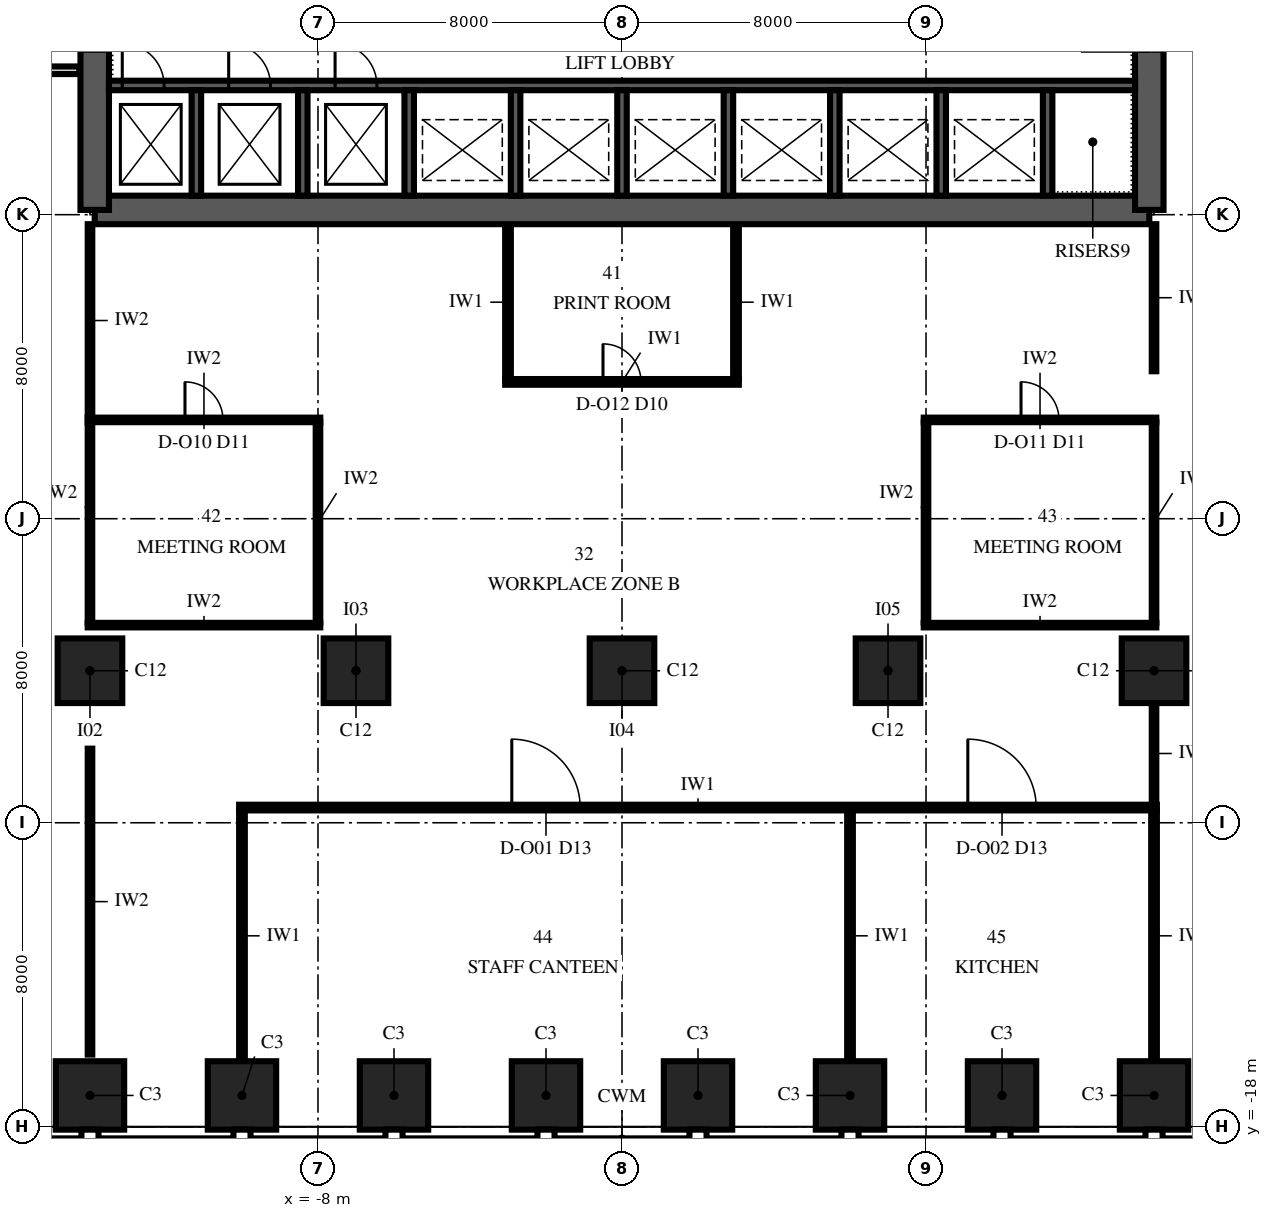
"""IFC4 building model, lengths in metres.
Left out: names, types, materials, properties, quantities, classifications, styles, units other than length and angle.
Written with IfcOpenShell. Run it as: python <this file> out.ifc"""

import sys

from ifc_helpers import new_model, si_unit, direction, frame, frame_2d, origin, origin_2d, place, context, subcontext, project, spatial, polyline, rectangle, outline, extrude, element, fill, save


model = new_model("IFC4")
c1 = context("Model", 3, precision=1e-05, world=origin(), true_north=direction((0.0, 1.0)))
c2 = subcontext(c1, "Body", "Model", "MODEL_VIEW")
j1 = project(units=[si_unit("LENGTHUNIT", "METRE"), si_unit("PLANEANGLEUNIT", "RADIAN")], contexts=[c1])
p1 = place(None, origin())
s1 = spatial("IfcSite", under=j1, at=p1, CompositionType="ELEMENT")
p2 = place(p1, origin())
s2 = spatial("IfcBuilding", under=s1, at=p2, CompositionType="ELEMENT")
p3 = place(p2, frame((0.0, 0.0, 127.0)))
s3 = spatial("IfcBuildingStorey", under=s2, at=p3, CompositionType="ELEMENT", Elevation=127.0)
for number, where, z_axis, x_axis in (
    (1, (-14.0, -17.175, 0.0), (0.0, 0.0, 1.0), (1.0, 0.0, 0.0)),
    (2, (-10.0, -17.175, 0.0), (0.0, 0.0, 1.0), (1.0, 0.0, 0.0)),
    (3, (-6.0, -17.175, 0.0), (0.0, 0.0, 1.0), (1.0, 0.0, 0.0)),
    (4, (-2.0, -17.175, 0.0), (0.0, 0.0, 1.0), (1.0, 0.0, 0.0)),
    (5, (2.0, -17.175, 0.0), (0.0, 0.0, 1.0), (1.0, 0.0, 0.0)),
    (6, (6.0, -17.175, 0.0), (0.0, 0.0, 1.0), (1.0, 0.0, 0.0)),
    (7, (10.0, -17.175, 0.0), (0.0, 0.0, 1.0), (1.0, 0.0, 0.0)),
    (8, (14.0, -17.175, 0.0), (0.0, 0.0, 1.0), (1.0, 0.0, 0.0)),
):
    element("IfcColumn", number, at=place(p3, frame(where, z_axis=z_axis, x_axis=x_axis)), inside=s3, PredefinedType="COLUMN", context=c2, shape_type="SweptSolid", body=[
        extrude(rectangle(XDim=1.8, YDim=1.8, at=origin_2d()), origin(), (0.0, 0.0, 1.0), 4.0),
    ])
for number, where, z_axis, x_axis in (
    (9, (-14.0, -6.0, 0.0), (0.0, 0.0, 1.0), (1.0, 0.0, 0.0)),
    (10, (-7.0, -6.0, 0.0), (0.0, 0.0, 1.0), (1.0, 0.0, 0.0)),
    (11, (0.0, -6.0, 0.0), (0.0, 0.0, 1.0), (1.0, 0.0, 0.0)),
    (12, (7.0, -6.0, 0.0), (0.0, 0.0, 1.0), (1.0, 0.0, 0.0)),
    (13, (14.0, -6.0, 0.0), (0.0, 0.0, 1.0), (1.0, 0.0, 0.0)),
):
    element("IfcColumn", number, at=place(p3, frame(where, z_axis=z_axis, x_axis=x_axis)), inside=s3, PredefinedType="COLUMN", context=c2, shape_type="SweptSolid", body=[
        extrude(rectangle(XDim=1.7, YDim=1.7, at=origin_2d()), origin(), (0.0, 0.0, 1.0), 4.0),
    ])
p4 = place(p3, frame((-13.875, 6.125, 0.0), z_axis=(0.0, 0.0, 1.0), x_axis=(1.0, 0.0, 0.0)))
e14 = element("IfcWall", 14, at=p4, inside=s3, PredefinedType="SHEAR", context=c2, shape_type="SweptSolid", body=[
    extrude(rectangle(XDim=27.75, YDim=0.75, at=frame_2d((13.875, 0.0))), origin(), (0.0, 0.0, 1.0), 4.0),
])
p5 = place(p3, frame((13.875, 6.125, 0.0), z_axis=(0.0, 0.0, 1.0), x_axis=(0.0, 1.0, 0.0)))
e15 = element("IfcWall", 15, at=p5, inside=s3, PredefinedType="SHEAR", context=c2, shape_type="SweptSolid", body=[
    extrude(outline(polyline([(0.0, -0.375), (17.75, -0.375), (17.75, 0.0), (17.375, 0.0), (17.375, 0.375), (0.375, 0.375), (0.375, 0.0), (0.0, 0.0), (0.0, -0.375)])), origin(), (0.0, 0.0, 1.0), 4.0),
])
p6 = place(p5, frame((4.175, 0.0, 0.0)))
e16 = element("IfcOpeningElement", 16, at=p6, cuts=e15, PredefinedType="OPENING", context=c2, shape_type="SweptSolid", body=[
    extrude(rectangle(XDim=1.8, YDim=2.4, at=frame_2d((0.9, 1.2))), frame((0.0, 0.39, 0.0), z_axis=(0.0, -1.0, 0.0), x_axis=(1.0, 0.0, 0.0)), (0.0, 0.0, 1.0), 0.78),
])
p7 = place(p3, frame((-13.875, 23.875, 0.0), z_axis=(0.0, 0.0, 1.0), x_axis=(0.0, -1.0, 0.0)))
e17 = element("IfcWall", 17, at=p7, inside=s3, PredefinedType="SHEAR", context=c2, shape_type="SweptSolid", body=[
    extrude(outline(polyline([(0.0, -0.375), (17.75, -0.375), (17.75, 0.0), (17.375, 0.0), (17.375, 0.375), (0.375, 0.375), (0.375, 0.0), (0.0, 0.0), (0.0, -0.375)])), origin(), (0.0, 0.0, 1.0), 4.0),
])
p8 = place(p7, frame((11.775, 0.0, 0.0)))
e18 = element("IfcOpeningElement", 18, at=p8, cuts=e17, PredefinedType="OPENING", context=c2, shape_type="SweptSolid", body=[
    extrude(rectangle(XDim=1.8, YDim=2.4, at=frame_2d((0.9, 1.2))), frame((0.0, 0.39, 0.0), z_axis=(0.0, -1.0, 0.0), x_axis=(1.0, 0.0, 0.0)), (0.0, 0.0, 1.0), 0.78),
])
p9 = place(p3, frame((-13.5, 9.4, 0.0), z_axis=(0.0, 0.0, 1.0), x_axis=(1.0, 0.0, 0.0)))
e19 = element("IfcWall", 19, at=p9, inside=s3, PredefinedType="SHEAR", context=c2, shape_type="SweptSolid", body=[
    extrude(rectangle(XDim=27.0, YDim=0.25, at=frame_2d((13.5, 0.0))), origin(), (0.0, 0.0, 1.0), 4.0),
])
p10 = place(p9, frame((0.35, 0.0, 0.0)))
e20 = element("IfcOpeningElement", 20, at=p10, cuts=e19, PredefinedType="OPENING", context=c2, shape_type="SweptSolid", body=[
    extrude(rectangle(XDim=1.1, YDim=2.1, at=frame_2d((0.55, 1.05))), frame((0.0, 0.14, 0.0), z_axis=(0.0, -1.0, 0.0), x_axis=(1.0, 0.0, 0.0)), (0.0, 0.0, 1.0), 0.28),
])
p11 = place(p9, frame((3.15, 0.0, 0.0)))
e21 = element("IfcOpeningElement", 21, at=p11, cuts=e19, PredefinedType="OPENING", context=c2, shape_type="SweptSolid", body=[
    extrude(rectangle(XDim=1.1, YDim=2.1, at=frame_2d((0.55, 1.05))), frame((0.0, 0.14, 0.0), z_axis=(0.0, -1.0, 0.0), x_axis=(1.0, 0.0, 0.0)), (0.0, 0.0, 1.0), 0.28),
])
p12 = place(p9, frame((5.95, 0.0, 0.0)))
e22 = element("IfcOpeningElement", 22, at=p12, cuts=e19, PredefinedType="OPENING", context=c2, shape_type="SweptSolid", body=[
    extrude(rectangle(XDim=1.1, YDim=2.1, at=frame_2d((0.55, 1.05))), frame((0.0, 0.14, 0.0), z_axis=(0.0, -1.0, 0.0), x_axis=(1.0, 0.0, 0.0)), (0.0, 0.0, 1.0), 0.28),
])
for number, where, z_axis, x_axis in (
    (23, (-11.2, 6.5, 0.0), (0.0, 0.0, 1.0), (0.0, 1.0, 0.0)),
    (24, (-8.4, 6.5, 0.0), (0.0, 0.0, 1.0), (0.0, 1.0, 0.0)),
    (25, (-5.6, 6.5, 0.0), (0.0, 0.0, 1.0), (0.0, 1.0, 0.0)),
    (26, (-2.8, 6.5, 0.0), (0.0, 0.0, 1.0), (0.0, 1.0, 0.0)),
    (27, (0.0, 6.5, 0.0), (0.0, 0.0, 1.0), (0.0, 1.0, 0.0)),
    (28, (2.8, 6.5, 0.0), (0.0, 0.0, 1.0), (0.0, 1.0, 0.0)),
    (29, (5.6, 6.5, 0.0), (0.0, 0.0, 1.0), (0.0, 1.0, 0.0)),
    (30, (8.4, 6.5, 0.0), (0.0, 0.0, 1.0), (0.0, 1.0, 0.0)),
    (31, (11.2, 6.5, 0.0), (0.0, 0.0, 1.0), (0.0, 1.0, 0.0)),
):
    element("IfcWall", number, at=place(p3, frame(where, z_axis=z_axis, x_axis=x_axis)), inside=s3, PredefinedType="SHEAR", context=c2, shape_type="SweptSolid", body=[
        extrude(rectangle(XDim=2.775, YDim=0.25, at=frame_2d((1.387, 0.0))), origin(), (0.0, 0.0, 1.0), 4.0),
    ])
p13 = place(p3, frame((-10.075, -9.6, 0.0), z_axis=(0.0, 0.0, 1.0), x_axis=(1.0, 0.0, 0.0)))
e32 = element("IfcWall", 32, at=p13, inside=s3, PredefinedType="PARTITIONING", context=c2, shape_type="SweptSolid", body=[
    extrude(rectangle(XDim=24.15, YDim=0.15, at=frame_2d((12.075, 0.0))), origin(), (0.0, 0.0, 1.0), 3.25),
])
p14 = place(p13, frame((7.175, 0.0, 0.0)))
e33 = element("IfcOpeningElement", 33, at=p14, cuts=e32, PredefinedType="OPENING", context=c2, shape_type="SweptSolid", body=[
    extrude(rectangle(XDim=1.8, YDim=2.4, at=frame_2d((0.9, 1.2))), frame((0.0, 0.09, 0.0), z_axis=(0.0, -1.0, 0.0), x_axis=(1.0, 0.0, 0.0)), (0.0, 0.0, 1.0), 0.18),
])
p15 = place(p13, frame((19.175, 0.0, 0.0)))
e34 = element("IfcOpeningElement", 34, at=p15, cuts=e32, PredefinedType="OPENING", context=c2, shape_type="SweptSolid", body=[
    extrude(rectangle(XDim=1.8, YDim=2.4, at=frame_2d((0.9, 1.2))), frame((0.0, 0.09, 0.0), z_axis=(0.0, -1.0, 0.0), x_axis=(1.0, 0.0, 0.0)), (0.0, 0.0, 1.0), 0.18),
])
for number, where, z_axis, x_axis in (
    (35, (-14.06, -4.8, 0.0), (0.0, 0.0, 1.0), (1.0, 0.0, 0.0)),
    (36, (7.94, -4.8, 0.0), (0.0, 0.0, 1.0), (1.0, 0.0, 0.0)),
):
    element("IfcWall", number, at=place(p3, frame(where, z_axis=z_axis, x_axis=x_axis)), inside=s3, PredefinedType="PARTITIONING", context=c2, shape_type="SweptSolid", body=[
        extrude(rectangle(XDim=6.12, YDim=0.12, at=frame_2d((3.06, 0.0))), origin(), (0.0, 0.0, 1.0), 3.25),
    ])
p16 = place(p3, frame((-14.06, 0.6, 0.0), z_axis=(0.0, 0.0, 1.0), x_axis=(1.0, 0.0, 0.0)))
e37 = element("IfcWall", 37, at=p16, inside=s3, PredefinedType="PARTITIONING", context=c2, shape_type="SweptSolid", body=[
    extrude(rectangle(XDim=6.12, YDim=0.12, at=frame_2d((3.06, 0.0))), origin(), (0.0, 0.0, 1.0), 3.25),
])
p17 = place(p16, frame((2.56, 0.0, 0.0)))
e38 = element("IfcOpeningElement", 38, at=p17, cuts=e37, PredefinedType="OPENING", context=c2, shape_type="SweptSolid", body=[
    extrude(rectangle(XDim=1.0, YDim=2.4, at=frame_2d((0.5, 1.2))), frame((0.0, 0.075, 0.0), z_axis=(0.0, -1.0, 0.0), x_axis=(1.0, 0.0, 0.0)), (0.0, 0.0, 1.0), 0.15),
])
p18 = place(p3, frame((7.94, 0.6, 0.0), z_axis=(0.0, 0.0, 1.0), x_axis=(1.0, 0.0, 0.0)))
e39 = element("IfcWall", 39, at=p18, inside=s3, PredefinedType="PARTITIONING", context=c2, shape_type="SweptSolid", body=[
    extrude(rectangle(XDim=6.12, YDim=0.12, at=frame_2d((3.06, 0.0))), origin(), (0.0, 0.0, 1.0), 3.25),
])
p19 = place(p18, frame((2.56, 0.0, 0.0)))
e40 = element("IfcOpeningElement", 40, at=p19, cuts=e39, PredefinedType="OPENING", context=c2, shape_type="SweptSolid", body=[
    extrude(rectangle(XDim=1.0, YDim=2.4, at=frame_2d((0.5, 1.2))), frame((0.0, 0.075, 0.0), z_axis=(0.0, -1.0, 0.0), x_axis=(1.0, 0.0, 0.0)), (0.0, 0.0, 1.0), 0.15),
])
p20 = place(p3, frame((-3.075, 1.6, 0.0), z_axis=(0.0, 0.0, 1.0), x_axis=(1.0, 0.0, 0.0)))
e41 = element("IfcWall", 41, at=p20, inside=s3, PredefinedType="PARTITIONING", context=c2, shape_type="SweptSolid", body=[
    extrude(rectangle(XDim=6.15, YDim=0.15, at=frame_2d((3.075, 0.0))), origin(), (0.0, 0.0, 1.0), 3.25),
])
p21 = place(p20, frame((2.575, 0.0, 0.0)))
e42 = element("IfcOpeningElement", 42, at=p21, cuts=e41, PredefinedType="OPENING", context=c2, shape_type="SweptSolid", body=[
    extrude(rectangle(XDim=1.0, YDim=2.3, at=frame_2d((0.5, 1.15))), frame((0.0, 0.09, 0.0), z_axis=(0.0, -1.0, 0.0), x_axis=(1.0, 0.0, 0.0)), (0.0, 0.0, 1.0), 0.18),
])
p22 = place(p3, frame((-16.3, 9.8, 0.0), z_axis=(0.0, 0.0, 1.0), x_axis=(1.0, 0.0, 0.0)))
e43 = element("IfcWall", 43, at=p22, inside=s3, PredefinedType="PARTITIONING", context=c2, shape_type="SweptSolid", body=[
    extrude(rectangle(XDim=2.02, YDim=0.2, at=frame_2d((1.01, 0.0))), origin(), (0.0, 0.0, 1.0), 3.85),
])
p23 = place(p3, frame((-14.0, -4.74, 0.0), z_axis=(0.0, 0.0, 1.0), x_axis=(0.0, 1.0, 0.0)))
e44 = element("IfcWall", 44, at=p23, inside=s3, PredefinedType="PARTITIONING", context=c2, shape_type="SweptSolid", body=[
    extrude(rectangle(XDim=5.28, YDim=0.12, at=frame_2d((2.64, 0.0))), origin(), (0.0, 0.0, 1.0), 3.25),
])
p24 = place(p3, frame((-10.0, -16.275, 0.0), z_axis=(0.0, 0.0, 1.0), x_axis=(0.0, 1.0, 0.0)))
e45 = element("IfcWall", 45, at=p24, inside=s3, PredefinedType="PARTITIONING", context=c2, shape_type="SweptSolid", body=[
    extrude(rectangle(XDim=6.6, YDim=0.15, at=frame_2d((3.3, 0.0))), origin(), (0.0, 0.0, 1.0), 3.25),
])
p25 = place(p3, frame((-8.0, -4.74, 0.0), z_axis=(0.0, 0.0, 1.0), x_axis=(0.0, 1.0, 0.0)))
e46 = element("IfcWall", 46, at=p25, inside=s3, PredefinedType="PARTITIONING", context=c2, shape_type="SweptSolid", body=[
    extrude(rectangle(XDim=5.28, YDim=0.12, at=frame_2d((2.64, 0.0))), origin(), (0.0, 0.0, 1.0), 3.85),
])
for number, where, z_axis, x_axis in (
    (47, (-3.0, 1.675, 0.0), (0.0, 0.0, 1.0), (0.0, 1.0, 0.0)),
    (48, (3.0, 1.675, 0.0), (0.0, 0.0, 1.0), (0.0, 1.0, 0.0)),
):
    element("IfcWall", number, at=place(p3, frame(where, z_axis=z_axis, x_axis=x_axis)), inside=s3, PredefinedType="PARTITIONING", context=c2, shape_type="SweptSolid", body=[
        extrude(rectangle(XDim=4.045, YDim=0.15, at=frame_2d((2.022, 0.0))), origin(), (0.0, 0.0, 1.0), 3.85),
    ])
p26 = place(p3, frame((6.0, -16.275, 0.0), z_axis=(0.0, 0.0, 1.0), x_axis=(0.0, 1.0, 0.0)))
e49 = element("IfcWall", 49, at=p26, inside=s3, PredefinedType="PARTITIONING", context=c2, shape_type="SweptSolid", body=[
    extrude(rectangle(XDim=6.6, YDim=0.15, at=frame_2d((3.3, 0.0))), origin(), (0.0, 0.0, 1.0), 3.25),
])
p27 = place(p3, frame((8.0, -4.74, 0.0), z_axis=(0.0, 0.0, 1.0), x_axis=(0.0, 1.0, 0.0)))
e50 = element("IfcWall", 50, at=p27, inside=s3, PredefinedType="PARTITIONING", context=c2, shape_type="SweptSolid", body=[
    extrude(rectangle(XDim=5.28, YDim=0.12, at=frame_2d((2.64, 0.0))), origin(), (0.0, 0.0, 1.0), 3.85),
])
p28 = place(p3, frame((14.0, -16.275, 0.0), z_axis=(0.0, 0.0, 1.0), x_axis=(0.0, 1.0, 0.0)))
e51 = element("IfcWall", 51, at=p28, inside=s3, PredefinedType="PARTITIONING", context=c2, shape_type="SweptSolid", body=[
    extrude(rectangle(XDim=6.6, YDim=0.15, at=frame_2d((3.3, 0.0))), origin(), (0.0, 0.0, 1.0), 3.25),
])
p29 = place(p3, frame((14.0, -4.74, 0.0), z_axis=(0.0, 0.0, 1.0), x_axis=(0.0, 1.0, 0.0)))
e52 = element("IfcWall", 52, at=p29, inside=s3, PredefinedType="PARTITIONING", context=c2, shape_type="SweptSolid", body=[
    extrude(rectangle(XDim=5.28, YDim=0.12, at=frame_2d((2.64, 0.0))), origin(), (0.0, 0.0, 1.0), 3.25),
])
p30 = place(p3, frame((-13.999, -16.1, 0.0), z_axis=(0.0, 0.0, 1.0), x_axis=(0.0, 1.0, 0.0)))
e53 = element("IfcWall", 53, at=p30, inside=s3, PredefinedType="PARTITIONING", context=c2, shape_type="SweptSolid", body=[
    extrude(rectangle(XDim=8.05, YDim=0.12, at=frame_2d((4.025, 0.0))), origin(), (0.0, 0.0, 1.0), 3.25),
])
p31 = place(p3, frame((-13.999, 0.68, 0.0), z_axis=(0.0, 0.0, 1.0), x_axis=(0.0, 1.0, 0.0)))
e54 = element("IfcWall", 54, at=p31, inside=s3, PredefinedType="PARTITIONING", context=c2, shape_type="SweptSolid", body=[
    extrude(rectangle(XDim=5.07, YDim=0.12, at=frame_2d((2.535, 0.0))), origin(), (0.0, 0.0, 1.0), 3.25),
])
p32 = place(p3, frame((14.0, -9.505, 0.0), z_axis=(0.0, 0.0, 1.0), x_axis=(0.0, 1.0, 0.0)))
e55 = element("IfcWall", 55, at=p32, inside=s3, PredefinedType="PARTITIONING", context=c2, shape_type="SweptSolid", body=[
    extrude(rectangle(XDim=2.655, YDim=0.12, at=frame_2d((1.327, 0.0))), origin(), (0.0, 0.0, 1.0), 3.25),
])
p33 = place(p3, frame((14.0, 1.88, 0.0), z_axis=(0.0, 0.0, 1.0), x_axis=(0.0, 1.0, 0.0)))
e56 = element("IfcWall", 56, at=p33, inside=s3, PredefinedType="PARTITIONING", context=c2, shape_type="SweptSolid", body=[
    extrude(rectangle(XDim=3.87, YDim=0.12, at=frame_2d((1.935, 0.0))), origin(), (0.0, 0.0, 1.0), 3.25),
])
p34 = place(p10, origin())
e57 = element("IfcDoor", 57, at=p34, inside=s3, OperationType="SLIDING_TO_LEFT", PredefinedType="DOOR", context=c2, shape_type="SweptSolid", body=[
    extrude(rectangle(XDim=1.1, YDim=2.1, at=frame_2d((0.55, 1.05))), frame((0.0, 0.125, 0.0), z_axis=(0.0, -1.0, 0.0), x_axis=(1.0, 0.0, 0.0)), (0.0, 0.0, 1.0), 0.25),
])
fill(e20, e57)
p35 = place(p11, origin())
e58 = element("IfcDoor", 58, at=p35, inside=s3, OperationType="SLIDING_TO_LEFT", PredefinedType="DOOR", context=c2, shape_type="SweptSolid", body=[
    extrude(rectangle(XDim=1.1, YDim=2.1, at=frame_2d((0.55, 1.05))), frame((0.0, 0.125, 0.0), z_axis=(0.0, -1.0, 0.0), x_axis=(1.0, 0.0, 0.0)), (0.0, 0.0, 1.0), 0.25),
])
fill(e21, e58)
p36 = place(p12, origin())
e59 = element("IfcDoor", 59, at=p36, inside=s3, OperationType="SLIDING_TO_LEFT", PredefinedType="DOOR", context=c2, shape_type="SweptSolid", body=[
    extrude(rectangle(XDim=1.1, YDim=2.1, at=frame_2d((0.55, 1.05))), frame((0.0, 0.125, 0.0), z_axis=(0.0, -1.0, 0.0), x_axis=(1.0, 0.0, 0.0)), (0.0, 0.0, 1.0), 0.25),
])
fill(e22, e59)
p37 = place(p14, origin())
e60 = element("IfcDoor", 60, at=p37, inside=s3, OperationType="DOUBLE_DOOR_SINGLE_SWING", PredefinedType="DOOR", context=c2, shape_type="SweptSolid", body=[
    extrude(rectangle(XDim=1.8, YDim=2.4, at=frame_2d((0.9, 1.2))), frame((0.0, 0.075, 0.0), z_axis=(0.0, -1.0, 0.0), x_axis=(1.0, 0.0, 0.0)), (0.0, 0.0, 1.0), 0.149),
])
fill(e33, e60)
p38 = place(p15, origin())
e61 = element("IfcDoor", 61, at=p38, inside=s3, OperationType="DOUBLE_DOOR_SINGLE_SWING", PredefinedType="DOOR", context=c2, shape_type="SweptSolid", body=[
    extrude(rectangle(XDim=1.8, YDim=2.4, at=frame_2d((0.9, 1.2))), frame((0.0, 0.075, 0.0), z_axis=(0.0, -1.0, 0.0), x_axis=(1.0, 0.0, 0.0)), (0.0, 0.0, 1.0), 0.149),
])
fill(e34, e61)
p39 = place(p17, origin())
e62 = element("IfcDoor", 62, at=p39, inside=s3, OperationType="SINGLE_SWING_RIGHT", PredefinedType="DOOR", context=c2, shape_type="SweptSolid", body=[
    extrude(rectangle(XDim=1.0, YDim=2.4, at=frame_2d((0.5, 1.2))), frame((0.0, 0.06, 0.0), z_axis=(0.0, -1.0, 0.0), x_axis=(1.0, 0.0, 0.0)), (0.0, 0.0, 1.0), 0.12),
])
fill(e38, e62)
p40 = place(p19, origin())
e63 = element("IfcDoor", 63, at=p40, inside=s3, OperationType="SINGLE_SWING_RIGHT", PredefinedType="DOOR", context=c2, shape_type="SweptSolid", body=[
    extrude(rectangle(XDim=1.0, YDim=2.4, at=frame_2d((0.5, 1.2))), frame((0.0, 0.06, 0.0), z_axis=(0.0, -1.0, 0.0), x_axis=(1.0, 0.0, 0.0)), (0.0, 0.0, 1.0), 0.12),
])
fill(e40, e63)
p41 = place(p21, origin())
e64 = element("IfcDoor", 64, at=p41, inside=s3, OperationType="SINGLE_SWING_LEFT", PredefinedType="DOOR", context=c2, shape_type="SweptSolid", body=[
    extrude(rectangle(XDim=1.0, YDim=2.3, at=frame_2d((0.5, 1.15))), frame((0.0, 0.075, 0.0), z_axis=(0.0, -1.0, 0.0), x_axis=(1.0, 0.0, 0.0)), (0.0, 0.0, 1.0), 0.149),
])
fill(e42, e64)
save(model, sys.argv[1])
